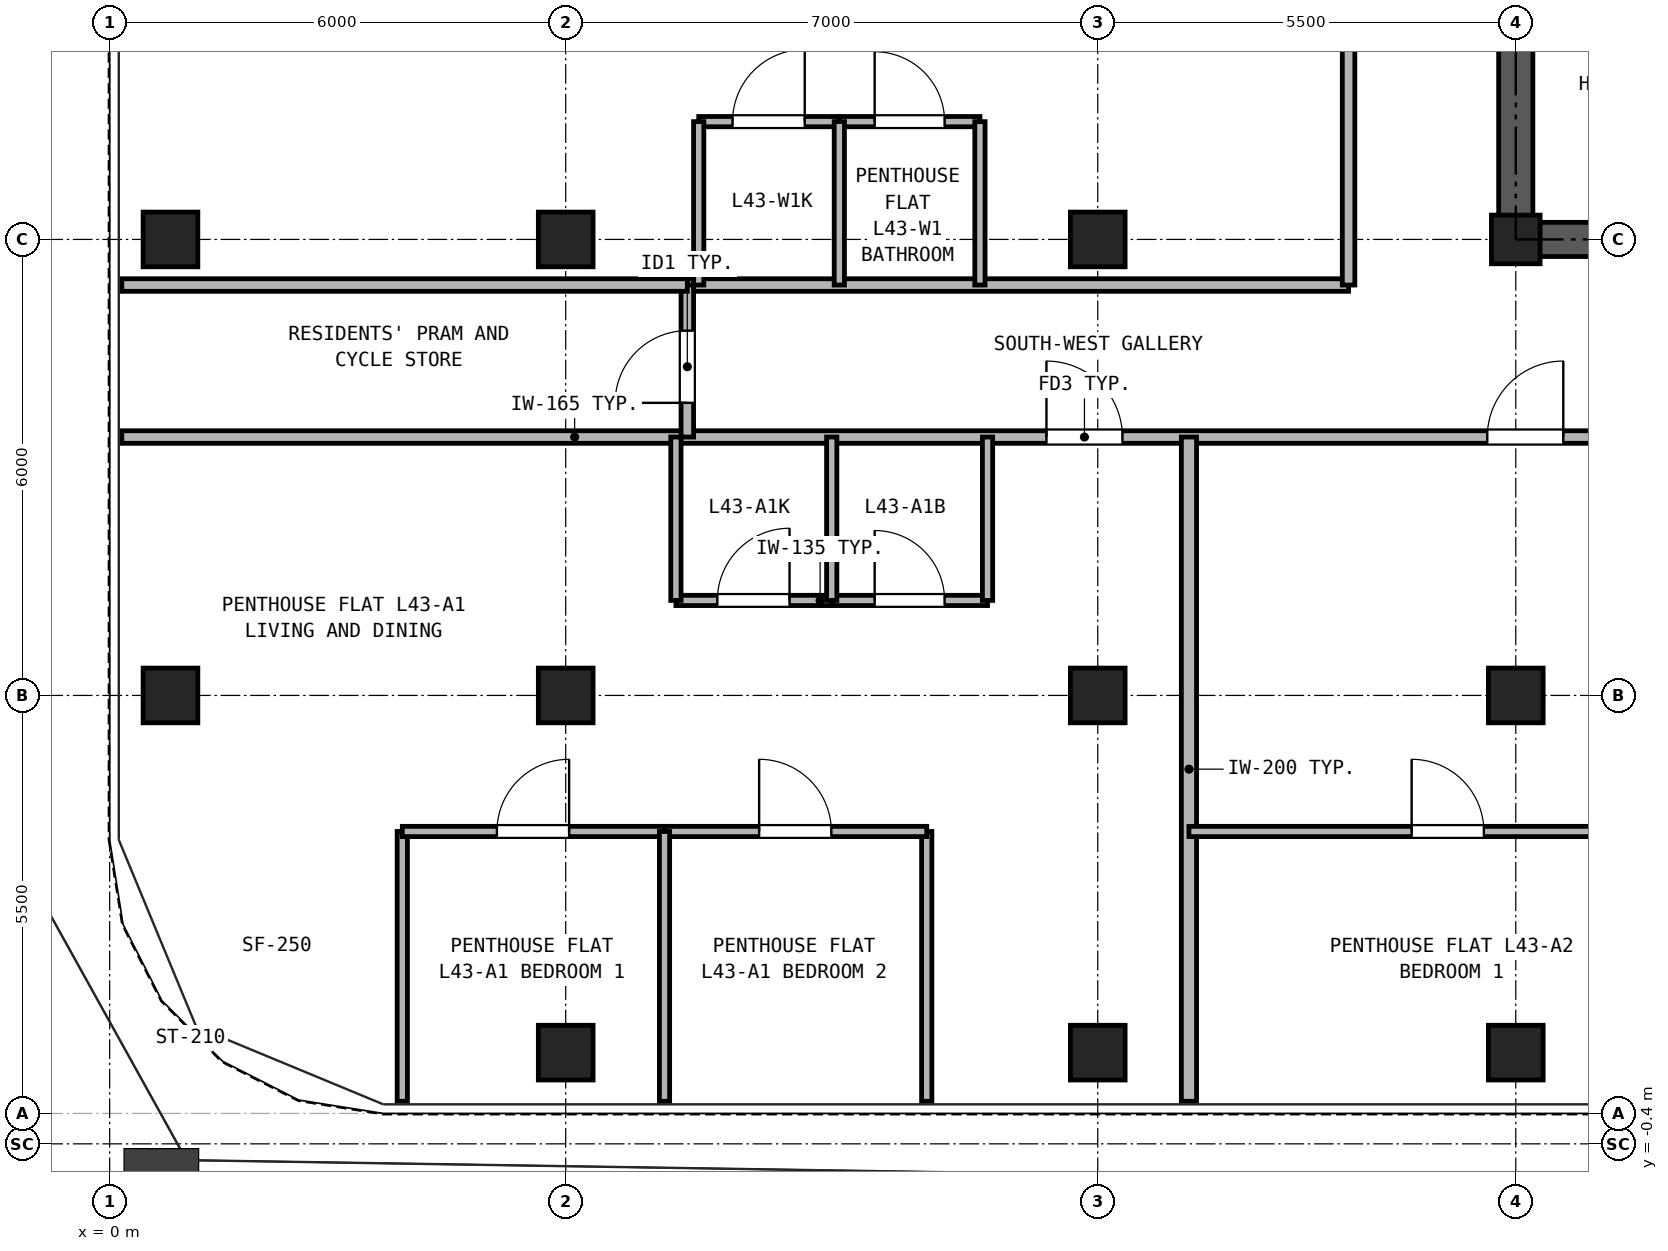
"""IFC4 building model, lengths in metres.
Left out: names, types, materials, properties, quantities, classifications, styles, units other than length and angle.
Written with IfcOpenShell. Run it as: python <this file> out.ifc"""

import sys

from ifc_helpers import new_model, si_unit, direction, frame, frame_2d, origin, origin_2d, place, context, subcontext, project, spatial, rectangle, hollow_rectangle, extrude, source, transform, mapped, element, fill, save


model = new_model("IFC4")
c1 = context("Model", 3, precision=1e-05, world=origin(), true_north=direction((0.0, 1.0)))
c2 = subcontext(c1, "Body", "Model", "MODEL_VIEW")
j1 = project(units=[si_unit("LENGTHUNIT", "METRE"), si_unit("PLANEANGLEUNIT", "RADIAN")], contexts=[c1])
p1 = place(None, origin())
s1 = spatial("IfcSite", under=j1, at=p1, CompositionType="ELEMENT")
p2 = place(p1, origin())
s2 = spatial("IfcBuilding", under=s1, at=p2, CompositionType="ELEMENT")
p3 = place(p2, frame((0.0, 0.0, 156.1)))
s3 = spatial("IfcBuildingStorey", under=s2, at=p3, CompositionType="ELEMENT", Elevation=156.1)
m1 = source(origin(), c2, "Body", "SweptSolid", [
    extrude(hollow_rectangle(XDim=0.72, YDim=0.72, WallThickness=0.04, at=origin_2d()), origin(), (0.0, 0.0, 1.0), 2.95),
])
for number, where, z_axis, x_axis in (
    (1, (6.0, 0.8, 0.0), (0.0, 0.0, 1.0), (1.0, 0.0, 0.0)),
    (2, (13.0, 0.8, 0.0), (0.0, 0.0, 1.0), (1.0, 0.0, 0.0)),
    (3, (18.5, 0.8, 0.0), (0.0, 0.0, 1.0), (1.0, 0.0, 0.0)),
    (4, (0.8, 5.5, 0.0), (0.0, 0.0, 1.0), (1.0, 0.0, 0.0)),
    (5, (0.8, 11.5, 0.0), (0.0, 0.0, 1.0), (1.0, 0.0, 0.0)),
    (6, (6.0, 5.5, 0.0), (0.0, 0.0, 1.0), (1.0, 0.0, 0.0)),
    (7, (6.0, 11.5, 0.0), (0.0, 0.0, 1.0), (1.0, 0.0, 0.0)),
    (8, (13.0, 5.5, 0.0), (0.0, 0.0, 1.0), (1.0, 0.0, 0.0)),
    (9, (13.0, 11.5, 0.0), (0.0, 0.0, 1.0), (1.0, 0.0, 0.0)),
    (10, (18.5, 5.5, 0.0), (0.0, 0.0, 1.0), (1.0, 0.0, 0.0)),
):
    element("IfcColumn", number, at=place(p3, frame(where, z_axis=z_axis, x_axis=x_axis)), inside=s3, PredefinedType="COLUMN", context=c2, shape_type="MappedRepresentation", body=[
        mapped(m1, transform((0.0, 0.0, 0.0), x_axis=(1.0, 0.0, 0.0), y_axis=(0.0, 1.0, 0.0), z_axis=(0.0, 0.0, 1.0), scale=1.0)),
    ])
m2 = source(origin(), c2, "Body", "SweptSolid", [
    extrude(hollow_rectangle(XDim=0.64, YDim=0.64, WallThickness=0.035, at=origin_2d()), origin(), (0.0, 0.0, 1.0), 2.95),
])
p4 = place(p3, frame((18.5, 11.5, 0.0), z_axis=(0.0, 0.0, 1.0), x_axis=(1.0, 0.0, 0.0)))
e11 = element("IfcColumn", 11, at=p4, inside=s3, PredefinedType="COLUMN", context=c2, shape_type="MappedRepresentation", body=[
    mapped(m2, transform((0.0, 0.0, 0.0), x_axis=(1.0, 0.0, 0.0), y_axis=(0.0, 1.0, 0.0), z_axis=(0.0, 0.0, 1.0), scale=1.0)),
])
p5 = place(p3, frame((18.275, 11.5, 0.0), z_axis=(0.0, 0.0, 1.0), x_axis=(1.0, 0.0, 0.0)))
e12 = element("IfcWall", 12, at=p5, inside=s3, PredefinedType="SHEAR", context=c2, shape_type="SweptSolid", body=[
    extrude(rectangle(XDim=10.45, YDim=0.45, at=frame_2d((5.225, 0.0))), origin(), (0.0, 0.0, 1.0), 2.95),
])
p6 = place(p5, frame((2.325, 0.0, 0.0)))
e13 = element("IfcOpeningElement", 13, at=p6, cuts=e12, PredefinedType="OPENING", context=c2, shape_type="SweptSolid", body=[
    extrude(rectangle(XDim=0.95, YDim=2.15, at=frame_2d((0.475, 1.075))), frame((0.0, 0.235, 0.0), z_axis=(0.0, -1.0, 0.0), x_axis=(1.0, 0.0, 0.0)), (0.0, 0.0, 1.0), 0.47),
])
p7 = place(p5, frame((8.225, 0.0, 0.0)))
e14 = element("IfcOpeningElement", 14, at=p7, cuts=e12, PredefinedType="OPENING", context=c2, shape_type="SweptSolid", body=[
    extrude(rectangle(XDim=1.1, YDim=2.25, at=frame_2d((0.55, 1.125))), frame((0.0, 0.235, 0.0), z_axis=(0.0, -1.0, 0.0), x_axis=(1.0, 0.0, 0.0)), (0.0, 0.0, 1.0), 0.47),
])
p8 = place(p3, frame((18.5, 11.725, 0.0), z_axis=(0.0, 0.0, 1.0), x_axis=(0.0, 1.0, 0.0)))
e15 = element("IfcWall", 15, at=p8, inside=s3, PredefinedType="SHEAR", context=c2, shape_type="SweptSolid", body=[
    extrude(rectangle(XDim=16.8, YDim=0.45, at=frame_2d((8.4, 0.0))), origin(), (0.0, 0.0, 1.0), 2.95),
])
p9 = place(p8, frame((7.425, 0.0, 0.0)))
e16 = element("IfcOpeningElement", 16, at=p9, cuts=e15, PredefinedType="OPENING", context=c2, shape_type="SweptSolid", body=[
    extrude(rectangle(XDim=1.15, YDim=2.2, at=frame_2d((0.575, 1.1))), frame((0.0, 0.235, 0.0), z_axis=(0.0, -1.0, 0.0), x_axis=(1.0, 0.0, 0.0)), (0.0, 0.0, 1.0), 0.47),
])
p10 = place(p3, frame((0.16, 8.9, 0.0), z_axis=(0.0, 0.0, 1.0), x_axis=(1.0, 0.0, 0.0)))
e17 = element("IfcWall", 17, at=p10, inside=s3, PredefinedType="PARTITIONING", context=c2, shape_type="SweptSolid", body=[
    extrude(rectangle(XDim=41.48, YDim=0.165, at=frame_2d((20.74, 0.0))), origin(), (0.0, 0.0, 1.0), 2.95),
])
p11 = place(p10, frame((12.165, 0.0, 0.0)))
e18 = element("IfcOpeningElement", 18, at=p11, cuts=e17, PredefinedType="OPENING", context=c2, shape_type="SweptSolid", body=[
    extrude(rectangle(XDim=1.0, YDim=2.15, at=frame_2d((0.5, 1.075))), frame((0.0, 0.093, 0.0), z_axis=(0.0, -1.0, 0.0), x_axis=(1.0, 0.0, 0.0)), (0.0, 0.0, 1.0), 0.185),
])
p12 = place(p10, frame((17.965, 0.0, 0.0)))
e19 = element("IfcOpeningElement", 19, at=p12, cuts=e17, PredefinedType="OPENING", context=c2, shape_type="SweptSolid", body=[
    extrude(rectangle(XDim=1.0, YDim=2.15, at=frame_2d((0.5, 1.075))), frame((0.0, 0.093, 0.0), z_axis=(0.0, -1.0, 0.0), x_axis=(1.0, 0.0, 0.0)), (0.0, 0.0, 1.0), 0.185),
])
p13 = place(p10, frame((31.115, 0.0, 0.0)))
e20 = element("IfcOpeningElement", 20, at=p13, cuts=e17, PredefinedType="OPENING", context=c2, shape_type="SweptSolid", body=[
    extrude(rectangle(XDim=1.0, YDim=2.15, at=frame_2d((0.5, 1.075))), frame((0.0, 0.093, 0.0), z_axis=(0.0, -1.0, 0.0), x_axis=(1.0, 0.0, 0.0)), (0.0, 0.0, 1.0), 0.185),
])
p14 = place(p3, frame((7.6, 10.9, 0.0), z_axis=(0.0, 0.0, 1.0), x_axis=(1.0, 0.0, 0.0)))
e21 = element("IfcWall", 21, at=p14, inside=s3, PredefinedType="PARTITIONING", context=c2, shape_type="SweptSolid", body=[
    extrude(rectangle(XDim=8.7, YDim=0.165, at=frame_2d((4.35, 0.0))), origin(), (0.0, 0.0, 1.0), 2.95),
])
p15 = place(p3, frame((7.6, 8.9, 0.0), z_axis=(0.0, 0.0, 1.0), x_axis=(0.0, 1.0, 0.0)))
e22 = element("IfcWall", 22, at=p15, inside=s3, PredefinedType="PARTITIONING", context=c2, shape_type="SweptSolid", body=[
    extrude(rectangle(XDim=2.0, YDim=0.165, at=frame_2d((1.0, 0.0))), origin(), (0.0, 0.0, 1.0), 2.95),
])
p16 = place(p15, frame((0.45, 0.0, 0.0)))
e23 = element("IfcOpeningElement", 23, at=p16, cuts=e22, PredefinedType="OPENING", context=c2, shape_type="SweptSolid", body=[
    extrude(rectangle(XDim=0.95, YDim=2.15, at=frame_2d((0.475, 1.075))), frame((0.0, 0.093, 0.0), z_axis=(0.0, -1.0, 0.0), x_axis=(1.0, 0.0, 0.0)), (0.0, 0.0, 1.0), 0.185),
])
p17 = place(p3, frame((16.3, 10.9, 0.0), z_axis=(0.0, 0.0, 1.0), x_axis=(0.0, 1.0, 0.0)))
e24 = element("IfcWall", 24, at=p17, inside=s3, PredefinedType="PARTITIONING", context=c2, shape_type="SweptSolid", body=[
    extrude(rectangle(XDim=24.24, YDim=0.165, at=frame_2d((12.12, 0.0))), origin(), (0.0, 0.0, 1.0), 2.95),
])
p18 = place(p17, frame((3.3, 0.0, 0.0)))
e25 = element("IfcOpeningElement", 25, at=p18, cuts=e24, PredefinedType="OPENING", context=c2, shape_type="SweptSolid", body=[
    extrude(rectangle(XDim=1.0, YDim=2.15, at=frame_2d((0.5, 1.075))), frame((0.0, 0.093, 0.0), z_axis=(0.0, -1.0, 0.0), x_axis=(1.0, 0.0, 0.0)), (0.0, 0.0, 1.0), 0.185),
])
p19 = place(p17, frame((11.25, 0.0, 0.0)))
e26 = element("IfcOpeningElement", 26, at=p19, cuts=e24, PredefinedType="OPENING", context=c2, shape_type="SweptSolid", body=[
    extrude(rectangle(XDim=1.0, YDim=2.15, at=frame_2d((0.5, 1.075))), frame((0.0, 0.093, 0.0), z_axis=(0.0, -1.0, 0.0), x_axis=(1.0, 0.0, 0.0)), (0.0, 0.0, 1.0), 0.185),
])
p20 = place(p17, frame((17.2, 0.0, 0.0)))
e27 = element("IfcOpeningElement", 27, at=p20, cuts=e24, PredefinedType="OPENING", context=c2, shape_type="SweptSolid", body=[
    extrude(rectangle(XDim=1.0, YDim=2.15, at=frame_2d((0.5, 1.075))), frame((0.0, 0.093, 0.0), z_axis=(0.0, -1.0, 0.0), x_axis=(1.0, 0.0, 0.0)), (0.0, 0.0, 1.0), 0.185),
])
p21 = place(p3, frame((7.45, 6.75, 0.0), z_axis=(0.0, 0.0, 1.0), x_axis=(1.0, 0.0, 0.0)))
e28 = element("IfcWall", 28, at=p21, inside=s3, PredefinedType="PARTITIONING", context=c2, shape_type="SweptSolid", body=[
    extrude(rectangle(XDim=2.05, YDim=0.135, at=frame_2d((1.025, 0.0))), origin(), (0.0, 0.0, 1.0), 2.95),
])
p22 = place(p21, frame((0.545, 0.0, 0.0)))
e29 = element("IfcOpeningElement", 29, at=p22, cuts=e28, PredefinedType="OPENING", context=c2, shape_type="SweptSolid", body=[
    extrude(rectangle(XDim=0.95, YDim=2.15, at=frame_2d((0.475, 1.075))), frame((0.0, 0.077, 0.0), z_axis=(0.0, -1.0, 0.0), x_axis=(1.0, 0.0, 0.0)), (0.0, 0.0, 1.0), 0.155),
])
p23 = place(p3, frame((9.5, 6.75, 0.0), z_axis=(0.0, 0.0, 1.0), x_axis=(1.0, 0.0, 0.0)))
e30 = element("IfcWall", 30, at=p23, inside=s3, PredefinedType="PARTITIONING", context=c2, shape_type="SweptSolid", body=[
    extrude(rectangle(XDim=2.05, YDim=0.135, at=frame_2d((1.025, 0.0))), origin(), (0.0, 0.0, 1.0), 2.95),
])
p24 = place(p23, frame((0.565, 0.0, 0.0)))
e31 = element("IfcOpeningElement", 31, at=p24, cuts=e30, PredefinedType="OPENING", context=c2, shape_type="SweptSolid", body=[
    extrude(rectangle(XDim=0.92, YDim=2.1, at=frame_2d((0.46, 1.05))), frame((0.0, 0.077, 0.0), z_axis=(0.0, -1.0, 0.0), x_axis=(1.0, 0.0, 0.0)), (0.0, 0.0, 1.0), 0.155),
])
for number, where, z_axis, x_axis in (
    (32, (7.45, 6.75, 0.0), (0.0, 0.0, 1.0), (0.0, 1.0, 0.0)),
    (33, (9.5, 6.75, 0.0), (0.0, 0.0, 1.0), (0.0, 1.0, 0.0)),
    (34, (11.55, 6.75, 0.0), (0.0, 0.0, 1.0), (0.0, 1.0, 0.0)),
):
    element("IfcWall", number, at=place(p3, frame(where, z_axis=z_axis, x_axis=x_axis)), inside=s3, PredefinedType="PARTITIONING", context=c2, shape_type="SweptSolid", body=[
        extrude(rectangle(XDim=2.15, YDim=0.135, at=frame_2d((1.075, 0.0))), origin(), (0.0, 0.0, 1.0), 2.95),
    ])
for number, where, z_axis, x_axis in (
    (35, (3.85, 0.16, 0.0), (0.0, 0.0, 1.0), (0.0, 1.0, 0.0)),
    (36, (10.75, 0.16, 0.0), (0.0, 0.0, 1.0), (0.0, 1.0, 0.0)),
):
    element("IfcWall", number, at=place(p3, frame(where, z_axis=z_axis, x_axis=x_axis)), inside=s3, PredefinedType="PARTITIONING", context=c2, shape_type="SweptSolid", body=[
        extrude(rectangle(XDim=3.55, YDim=0.135, at=frame_2d((1.775, 0.0))), origin(), (0.0, 0.0, 1.0), 2.95),
    ])
p25 = place(p3, frame((3.85, 3.71, 0.0), z_axis=(0.0, 0.0, 1.0), x_axis=(1.0, 0.0, 0.0)))
e37 = element("IfcWall", 37, at=p25, inside=s3, PredefinedType="PARTITIONING", context=c2, shape_type="SweptSolid", body=[
    extrude(rectangle(XDim=3.45, YDim=0.135, at=frame_2d((1.725, 0.0))), origin(), (0.0, 0.0, 1.0), 2.95),
])
p26 = place(p25, frame((1.245, 0.0, 0.0)))
e38 = element("IfcOpeningElement", 38, at=p26, cuts=e37, PredefinedType="OPENING", context=c2, shape_type="SweptSolid", body=[
    extrude(rectangle(XDim=0.95, YDim=2.15, at=frame_2d((0.475, 1.075))), frame((0.0, 0.077, 0.0), z_axis=(0.0, -1.0, 0.0), x_axis=(1.0, 0.0, 0.0)), (0.0, 0.0, 1.0), 0.155),
])
p27 = place(p3, frame((7.3, 3.71, 0.0), z_axis=(0.0, 0.0, 1.0), x_axis=(1.0, 0.0, 0.0)))
e39 = element("IfcWall", 39, at=p27, inside=s3, PredefinedType="PARTITIONING", context=c2, shape_type="SweptSolid", body=[
    extrude(rectangle(XDim=3.45, YDim=0.135, at=frame_2d((1.725, 0.0))), origin(), (0.0, 0.0, 1.0), 2.95),
])
p28 = place(p27, frame((1.245, 0.0, 0.0)))
e40 = element("IfcOpeningElement", 40, at=p28, cuts=e39, PredefinedType="OPENING", context=c2, shape_type="SweptSolid", body=[
    extrude(rectangle(XDim=0.95, YDim=2.15, at=frame_2d((0.475, 1.075))), frame((0.0, 0.077, 0.0), z_axis=(0.0, -1.0, 0.0), x_axis=(1.0, 0.0, 0.0)), (0.0, 0.0, 1.0), 0.155),
])
p29 = place(p3, frame((7.3, 0.16, 0.0), z_axis=(0.0, 0.0, 1.0), x_axis=(0.0, 1.0, 0.0)))
e41 = element("IfcWall", 41, at=p29, inside=s3, PredefinedType="PARTITIONING", context=c2, shape_type="SweptSolid", body=[
    extrude(rectangle(XDim=3.55, YDim=0.135, at=frame_2d((1.775, 0.0))), origin(), (0.0, 0.0, 1.0), 2.95),
])
p30 = place(p3, frame((14.2, 0.16, 0.0), z_axis=(0.0, 0.0, 1.0), x_axis=(0.0, 1.0, 0.0)))
e42 = element("IfcWall", 42, at=p30, inside=s3, PredefinedType="PARTITIONING", context=c2, shape_type="SweptSolid", body=[
    extrude(rectangle(XDim=8.74, YDim=0.2, at=frame_2d((4.37, 0.0))), origin(), (0.0, 0.0, 1.0), 2.95),
])
p31 = place(p3, frame((14.2, 3.71, 0.0), z_axis=(0.0, 0.0, 1.0), x_axis=(1.0, 0.0, 0.0)))
e43 = element("IfcWall", 43, at=p31, inside=s3, PredefinedType="PARTITIONING", context=c2, shape_type="SweptSolid", body=[
    extrude(rectangle(XDim=6.82, YDim=0.135, at=frame_2d((3.41, 0.0))), origin(), (0.0, 0.0, 1.0), 2.95),
])
p32 = place(p31, frame((2.93, 0.0, 0.0)))
e44 = element("IfcOpeningElement", 44, at=p32, cuts=e43, PredefinedType="OPENING", context=c2, shape_type="SweptSolid", body=[
    extrude(rectangle(XDim=0.95, YDim=2.15, at=frame_2d((0.475, 1.075))), frame((0.0, 0.077, 0.0), z_axis=(0.0, -1.0, 0.0), x_axis=(1.0, 0.0, 0.0)), (0.0, 0.0, 1.0), 0.155),
])
p33 = place(p3, frame((0.16, 10.9, 0.0), z_axis=(0.0, 0.0, 1.0), x_axis=(1.0, 0.0, 0.0)))
e45 = element("IfcWall", 45, at=p33, inside=s3, PredefinedType="PARTITIONING", context=c2, shape_type="SweptSolid", body=[
    extrude(rectangle(XDim=7.44, YDim=0.165, at=frame_2d((3.72, 0.0))), origin(), (0.0, 0.0, 1.0), 2.95),
])
p34 = place(p3, frame((7.75, 13.05, 0.0), z_axis=(0.0, 0.0, 1.0), x_axis=(1.0, 0.0, 0.0)))
e46 = element("IfcWall", 46, at=p34, inside=s3, PredefinedType="PARTITIONING", context=c2, shape_type="SweptSolid", body=[
    extrude(rectangle(XDim=1.85, YDim=0.135, at=frame_2d((0.925, 0.0))), origin(), (0.0, 0.0, 1.0), 2.95),
])
p35 = place(p34, frame((0.445, 0.0, 0.0)))
e47 = element("IfcOpeningElement", 47, at=p35, cuts=e46, PredefinedType="OPENING", context=c2, shape_type="SweptSolid", body=[
    extrude(rectangle(XDim=0.95, YDim=2.15, at=frame_2d((0.475, 1.075))), frame((0.0, 0.077, 0.0), z_axis=(0.0, -1.0, 0.0), x_axis=(1.0, 0.0, 0.0)), (0.0, 0.0, 1.0), 0.155),
])
p36 = place(p3, frame((9.6, 13.05, 0.0), z_axis=(0.0, 0.0, 1.0), x_axis=(1.0, 0.0, 0.0)))
e48 = element("IfcWall", 48, at=p36, inside=s3, PredefinedType="PARTITIONING", context=c2, shape_type="SweptSolid", body=[
    extrude(rectangle(XDim=1.85, YDim=0.135, at=frame_2d((0.925, 0.0))), origin(), (0.0, 0.0, 1.0), 2.95),
])
p37 = place(p36, frame((0.465, 0.0, 0.0)))
e49 = element("IfcOpeningElement", 49, at=p37, cuts=e48, PredefinedType="OPENING", context=c2, shape_type="SweptSolid", body=[
    extrude(rectangle(XDim=0.92, YDim=2.1, at=frame_2d((0.46, 1.05))), frame((0.0, 0.077, 0.0), z_axis=(0.0, -1.0, 0.0), x_axis=(1.0, 0.0, 0.0)), (0.0, 0.0, 1.0), 0.155),
])
for number, where, z_axis, x_axis in (
    (50, (7.75, 10.9, 0.0), (0.0, 0.0, 1.0), (0.0, 1.0, 0.0)),
    (51, (9.6, 10.9, 0.0), (0.0, 0.0, 1.0), (0.0, 1.0, 0.0)),
    (52, (11.45, 10.9, 0.0), (0.0, 0.0, 1.0), (0.0, 1.0, 0.0)),
):
    element("IfcWall", number, at=place(p3, frame(where, z_axis=z_axis, x_axis=x_axis)), inside=s3, PredefinedType="PARTITIONING", context=c2, shape_type="SweptSolid", body=[
        extrude(rectangle(XDim=2.15, YDim=0.135, at=frame_2d((1.075, 0.0))), origin(), (0.0, 0.0, 1.0), 2.95),
    ])
p38 = place(p22, origin())
e53 = element("IfcDoor", 53, at=p38, inside=s3, OperationType="SINGLE_SWING_RIGHT", PredefinedType="DOOR", context=c2, shape_type="SweptSolid", body=[
    extrude(rectangle(XDim=0.95, YDim=2.15, at=frame_2d((0.475, 1.075))), frame((0.0, 0.025, 0.0), z_axis=(0.0, -1.0, 0.0), x_axis=(1.0, 0.0, 0.0)), (0.0, 0.0, 1.0), 0.05),
])
fill(e29, e53)
p39 = place(p24, origin())
e54 = element("IfcDoor", 54, at=p39, inside=s3, OperationType="SINGLE_SWING_LEFT", PredefinedType="DOOR", context=c2, shape_type="SweptSolid", body=[
    extrude(rectangle(XDim=0.92, YDim=2.1, at=frame_2d((0.46, 1.05))), frame((0.0, 0.025, 0.0), z_axis=(0.0, -1.0, 0.0), x_axis=(1.0, 0.0, 0.0)), (0.0, 0.0, 1.0), 0.05),
])
fill(e31, e54)
p40 = place(p26, frame((0.95, 0.0, 0.0), z_axis=(0.0, 0.0, 1.0), x_axis=(-1.0, 0.0, 0.0)))
e55 = element("IfcDoor", 55, at=p40, inside=s3, OperationType="SINGLE_SWING_RIGHT", PredefinedType="DOOR", context=c2, shape_type="SweptSolid", body=[
    extrude(rectangle(XDim=0.95, YDim=2.15, at=frame_2d((0.475, 1.075))), frame((0.0, 0.025, 0.0), z_axis=(0.0, -1.0, 0.0), x_axis=(1.0, 0.0, 0.0)), (0.0, 0.0, 1.0), 0.05),
])
fill(e38, e55)
p41 = place(p28, frame((0.95, 0.0, 0.0), z_axis=(0.0, 0.0, 1.0), x_axis=(-1.0, 0.0, 0.0)))
e56 = element("IfcDoor", 56, at=p41, inside=s3, OperationType="SINGLE_SWING_LEFT", PredefinedType="DOOR", context=c2, shape_type="SweptSolid", body=[
    extrude(rectangle(XDim=0.95, YDim=2.15, at=frame_2d((0.475, 1.075))), frame((0.0, 0.025, 0.0), z_axis=(0.0, -1.0, 0.0), x_axis=(1.0, 0.0, 0.0)), (0.0, 0.0, 1.0), 0.05),
])
fill(e40, e56)
p42 = place(p11, frame((1.0, 0.0, 0.0), z_axis=(0.0, 0.0, 1.0), x_axis=(-1.0, 0.0, 0.0)))
e57 = element("IfcDoor", 57, at=p42, inside=s3, OperationType="SINGLE_SWING_LEFT", PredefinedType="DOOR", context=c2, shape_type="SweptSolid", body=[
    extrude(rectangle(XDim=1.0, YDim=2.15, at=frame_2d((0.5, 1.075))), frame((0.0, 0.025, 0.0), z_axis=(0.0, -1.0, 0.0), x_axis=(1.0, 0.0, 0.0)), (0.0, 0.0, 1.0), 0.05),
])
fill(e18, e57)
p43 = place(p32, frame((0.95, 0.0, 0.0), z_axis=(0.0, 0.0, 1.0), x_axis=(-1.0, 0.0, 0.0)))
e58 = element("IfcDoor", 58, at=p43, inside=s3, OperationType="SINGLE_SWING_LEFT", PredefinedType="DOOR", context=c2, shape_type="SweptSolid", body=[
    extrude(rectangle(XDim=0.95, YDim=2.15, at=frame_2d((0.475, 1.075))), frame((0.0, 0.025, 0.0), z_axis=(0.0, -1.0, 0.0), x_axis=(1.0, 0.0, 0.0)), (0.0, 0.0, 1.0), 0.05),
])
fill(e44, e58)
p44 = place(p12, frame((1.0, 0.0, 0.0), z_axis=(0.0, 0.0, 1.0), x_axis=(-1.0, 0.0, 0.0)))
e59 = element("IfcDoor", 59, at=p44, inside=s3, OperationType="SINGLE_SWING_RIGHT", PredefinedType="DOOR", context=c2, shape_type="SweptSolid", body=[
    extrude(rectangle(XDim=1.0, YDim=2.15, at=frame_2d((0.5, 1.075))), frame((0.0, 0.025, 0.0), z_axis=(0.0, -1.0, 0.0), x_axis=(1.0, 0.0, 0.0)), (0.0, 0.0, 1.0), 0.05),
])
fill(e19, e59)
p45 = place(p16, frame((0.95, 0.0, 0.0), z_axis=(0.0, 0.0, 1.0), x_axis=(-1.0, 0.0, 0.0)))
e60 = element("IfcDoor", 60, at=p45, inside=s3, OperationType="SINGLE_SWING_LEFT", PredefinedType="DOOR", context=c2, shape_type="SweptSolid", body=[
    extrude(rectangle(XDim=0.95, YDim=2.15, at=frame_2d((0.475, 1.075))), frame((0.0, 0.025, 0.0), z_axis=(0.0, -1.0, 0.0), x_axis=(1.0, 0.0, 0.0)), (0.0, 0.0, 1.0), 0.05),
])
fill(e23, e60)
p46 = place(p35, origin())
e61 = element("IfcDoor", 61, at=p46, inside=s3, OperationType="SINGLE_SWING_RIGHT", PredefinedType="DOOR", context=c2, shape_type="SweptSolid", body=[
    extrude(rectangle(XDim=0.95, YDim=2.15, at=frame_2d((0.475, 1.075))), frame((0.0, 0.025, 0.0), z_axis=(0.0, -1.0, 0.0), x_axis=(1.0, 0.0, 0.0)), (0.0, 0.0, 1.0), 0.05),
])
fill(e47, e61)
p47 = place(p37, origin())
e62 = element("IfcDoor", 62, at=p47, inside=s3, OperationType="SINGLE_SWING_LEFT", PredefinedType="DOOR", context=c2, shape_type="SweptSolid", body=[
    extrude(rectangle(XDim=0.92, YDim=2.1, at=frame_2d((0.46, 1.05))), frame((0.0, 0.025, 0.0), z_axis=(0.0, -1.0, 0.0), x_axis=(1.0, 0.0, 0.0)), (0.0, 0.0, 1.0), 0.05),
])
fill(e49, e62)
save(model, sys.argv[1])
